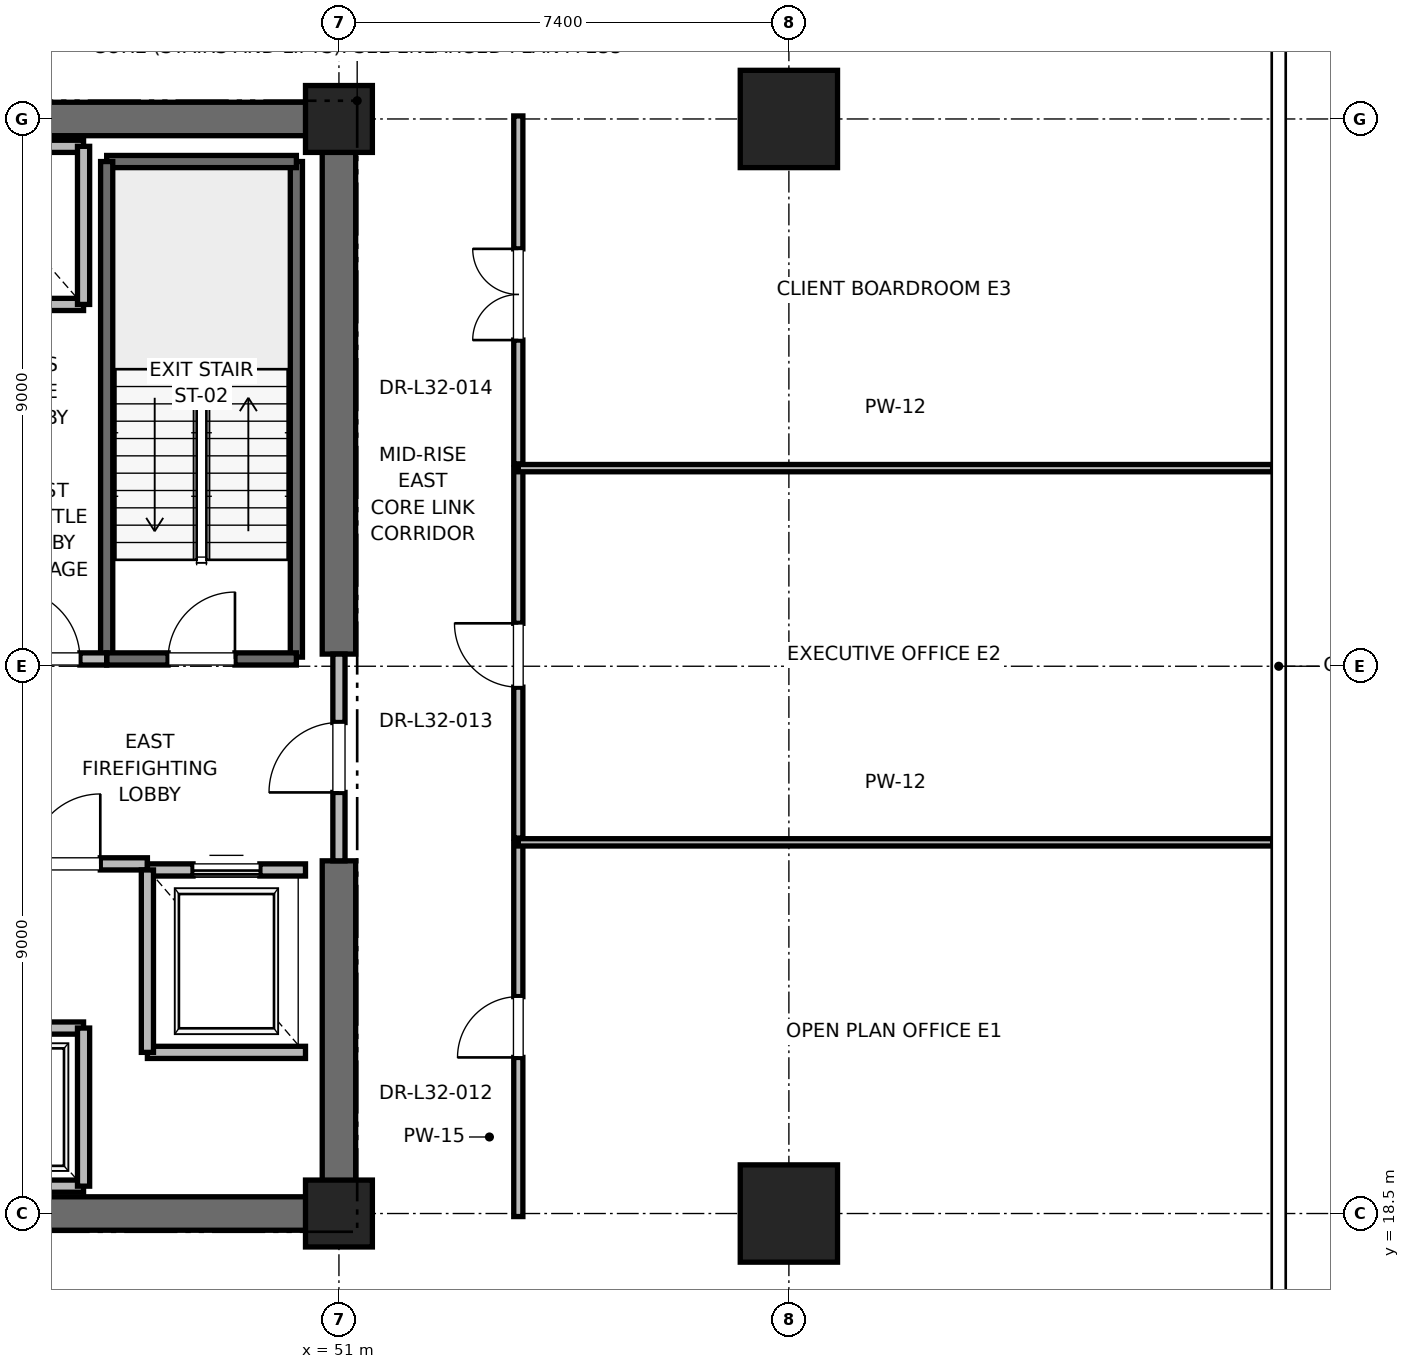
"""IFC4 building model, lengths in metres.
Left out: names, types, materials, properties, quantities, classifications, styles, units other than length and angle.
Written with IfcOpenShell. Run it as: python <this file> out.ifc"""

import sys

from ifc_helpers import new_model, si_unit, direction, frame, frame_2d, origin, origin_2d, place, context, subcontext, project, spatial, rectangle, extrude, element, fill, save


model = new_model("IFC4")
c1 = context("Model", 3, precision=1e-05, world=origin(), true_north=direction((0.0, 1.0)))
c2 = subcontext(c1, "Body", "Model", "MODEL_VIEW")
j1 = project(units=[si_unit("LENGTHUNIT", "METRE"), si_unit("PLANEANGLEUNIT", "RADIAN")], contexts=[c1])
p1 = place(None, origin())
s1 = spatial("IfcSite", under=j1, at=p1, CompositionType="ELEMENT")
p2 = place(p1, origin())
s2 = spatial("IfcBuilding", under=s1, at=p2, CompositionType="ELEMENT")
p3 = place(p2, frame((0.0, 0.0, 140.4)))
s3 = spatial("IfcBuildingStorey", under=s2, at=p3, CompositionType="ELEMENT", Elevation=140.4)
for number, where, z_axis, x_axis in (
    (1, (58.4, 18.5, 0.0), (0.0, 0.0, 1.0), (1.0, 0.0, 0.0)),
    (2, (58.4, 36.5, 0.0), (0.0, 0.0, 1.0), (1.0, 0.0, 0.0)),
):
    element("IfcColumn", number, at=place(p3, frame(where, z_axis=z_axis, x_axis=x_axis)), inside=s3, PredefinedType="COLUMN", context=c2, shape_type="SweptSolid", body=[
        extrude(rectangle(XDim=1.6, YDim=1.6, at=origin_2d()), origin(), (0.0, 0.0, 1.0), 4.0),
    ])
for number, where, z_axis, x_axis in (
    (3, (51.0, 18.5, 0.0), (0.0, 0.0, 1.0), (1.0, 0.0, 0.0)),
    (4, (51.0, 36.5, 0.0), (0.0, 0.0, 1.0), (1.0, 0.0, 0.0)),
):
    element("IfcColumn", number, at=place(p3, frame(where, z_axis=z_axis, x_axis=x_axis)), inside=s3, PredefinedType="PILASTER", context=c2, shape_type="SweptSolid", body=[
        extrude(rectangle(XDim=1.1, YDim=1.1, at=origin_2d()), origin(), (0.0, 0.0, 1.0), 4.0),
    ])
p4 = place(p3, frame((41.8, 18.5, 0.0), z_axis=(0.0, 0.0, 1.0), x_axis=(1.0, 0.0, 0.0)))
e5 = element("IfcWall", 5, at=p4, inside=s3, PredefinedType="SHEAR", context=c2, shape_type="SweptSolid", body=[
    extrude(rectangle(XDim=9.2, YDim=0.55, at=frame_2d((4.6, 0.0))), origin(), (0.0, 0.0, 1.0), 3.775),
])
for number, where, z_axis, x_axis in (
    (6, (45.2, 36.5, 0.0), (0.0, 0.0, 1.0), (1.0, 0.0, 0.0)),
    (7, (51.0, 18.5, 0.0), (0.0, 0.0, 1.0), (0.0, 1.0, 0.0)),
):
    element("IfcWall", number, at=place(p3, frame(where, z_axis=z_axis, x_axis=x_axis)), inside=s3, PredefinedType="SHEAR", context=c2, shape_type="SweptSolid", body=[
        extrude(rectangle(XDim=5.8, YDim=0.55, at=frame_2d((2.9, 0.0))), origin(), (0.0, 0.0, 1.0), 3.775),
    ])
p5 = place(p3, frame((51.0, 27.7, 0.0), z_axis=(0.0, 0.0, 1.0), x_axis=(0.0, 1.0, 0.0)))
e8 = element("IfcWall", 8, at=p5, inside=s3, PredefinedType="SHEAR", context=c2, shape_type="SweptSolid", body=[
    extrude(rectangle(XDim=8.8, YDim=0.55, at=frame_2d((4.4, 0.0))), origin(), (0.0, 0.0, 1.0), 3.775),
])
p6 = place(p3, frame((50.3, 27.65, 0.0), z_axis=(0.0, 0.0, 1.0), x_axis=(0.0, 1.0, 0.0)))
e9 = element("IfcWall", 9, at=p6, inside=s3, PredefinedType="SOLIDWALL", context=c2, shape_type="SweptSolid", body=[
    extrude(rectangle(XDim=8.15, YDim=0.2, at=frame_2d((4.075, 0.0))), origin(), (0.0, 0.0, 1.0), 3.775),
])
p7 = place(p3, frame((47.18, 35.8, 0.0), z_axis=(0.0, 0.0, 1.0), x_axis=(1.0, 0.0, 0.0)))
e10 = element("IfcWall", 10, at=p7, inside=s3, PredefinedType="SOLIDWALL", context=c2, shape_type="SweptSolid", body=[
    extrude(rectangle(XDim=3.12, YDim=0.2, at=frame_2d((1.56, 0.0))), origin(), (0.0, 0.0, 1.0), 3.775),
])
p8 = place(p3, frame((47.18, 27.62, 0.0), z_axis=(0.0, 0.0, 1.0), x_axis=(0.0, 1.0, 0.0)))
e11 = element("IfcWall", 11, at=p8, inside=s3, PredefinedType="SOLIDWALL", context=c2, shape_type="SweptSolid", body=[
    extrude(rectangle(XDim=8.18, YDim=0.2, at=frame_2d((4.09, 0.0))), origin(), (0.0, 0.0, 1.0), 3.775),
])
p9 = place(p3, frame((47.18, 27.62, 0.0), z_axis=(0.0, 0.0, 1.0), x_axis=(1.0, 0.0, 0.0)))
e12 = element("IfcWall", 12, at=p9, inside=s3, PredefinedType="SOLIDWALL", context=c2, shape_type="SweptSolid", body=[
    extrude(rectangle(XDim=3.12, YDim=0.2, at=frame_2d((1.56, 0.0))), origin(), (0.0, 0.0, 1.0), 3.775),
])
p10 = place(p9, frame((1.01, 0.0, 0.0)))
e13 = element("IfcOpeningElement", 13, at=p10, cuts=e12, PredefinedType="OPENING", context=c2, shape_type="SweptSolid", body=[
    extrude(rectangle(XDim=1.1, YDim=2.15, at=frame_2d((0.55, 1.075))), frame((0.0, 0.1, 0.0), z_axis=(0.0, -1.0, 0.0), x_axis=(1.0, 0.0, 0.0)), (0.0, 0.0, 1.0), 0.2),
])
p11 = place(p3, frame((45.15, 24.25, 0.0), z_axis=(0.0, 0.0, 1.0), x_axis=(1.0, 0.0, 0.0)))
e14 = element("IfcWall", 14, at=p11, inside=s3, PredefinedType="PARTITIONING", context=c2, shape_type="SweptSolid", body=[
    extrude(rectangle(XDim=2.7, YDim=0.2, at=frame_2d((1.35, 0.0))), origin(), (0.0, 0.0, 1.0), 3.775),
])
p12 = place(p11, frame((0.775, 0.0, 0.0)))
e15 = element("IfcOpeningElement", 15, at=p12, cuts=e14, PredefinedType="OPENING", context=c2, shape_type="SweptSolid", body=[
    extrude(rectangle(XDim=1.15, YDim=2.2, at=frame_2d((0.575, 1.1))), frame((0.0, 0.1, 0.0), z_axis=(0.0, -1.0, 0.0), x_axis=(1.0, 0.0, 0.0)), (0.0, 0.0, 1.0), 0.2),
])
p13 = place(p3, frame((45.15, 27.62, 0.0), z_axis=(0.0, 0.0, 1.0), x_axis=(1.0, 0.0, 0.0)))
e16 = element("IfcWall", 16, at=p13, inside=s3, PredefinedType="PARTITIONING", context=c2, shape_type="SweptSolid", body=[
    extrude(rectangle(XDim=2.03, YDim=0.2, at=frame_2d((1.015, 0.0))), origin(), (0.0, 0.0, 1.0), 3.775),
])
p14 = place(p13, frame((0.44, 0.0, 0.0)))
e17 = element("IfcOpeningElement", 17, at=p14, cuts=e16, PredefinedType="OPENING", context=c2, shape_type="SweptSolid", body=[
    extrude(rectangle(XDim=1.15, YDim=2.2, at=frame_2d((0.575, 1.1))), frame((0.0, 0.1, 0.0), z_axis=(0.0, -1.0, 0.0), x_axis=(1.0, 0.0, 0.0)), (0.0, 0.0, 1.0), 0.2),
])
p15 = place(p3, frame((51.0, 24.3, 0.0), z_axis=(0.0, 0.0, 1.0), x_axis=(0.0, 1.0, 0.0)))
e18 = element("IfcWall", 18, at=p15, inside=s3, PredefinedType="PARTITIONING", context=c2, shape_type="SweptSolid", body=[
    extrude(rectangle(XDim=3.4, YDim=0.2, at=frame_2d((1.7, 0.0))), origin(), (0.0, 0.0, 1.0), 2.755),
])
p16 = place(p15, frame((1.125, 0.0, 0.0)))
e19 = element("IfcOpeningElement", 19, at=p16, cuts=e18, PredefinedType="OPENING", context=c2, shape_type="SweptSolid", body=[
    extrude(rectangle(XDim=1.15, YDim=2.2, at=frame_2d((0.575, 1.1))), frame((0.0, 0.1, 0.0), z_axis=(0.0, -1.0, 0.0), x_axis=(1.0, 0.0, 0.0)), (0.0, 0.0, 1.0), 0.2),
])
p17 = place(p3, frame((47.85, 21.15, 0.0), z_axis=(0.0, 0.0, 1.0), x_axis=(1.0, 0.0, 0.0)))
e20 = element("IfcWall", 20, at=p17, inside=s3, PredefinedType="SOLIDWALL", context=c2, shape_type="SweptSolid", body=[
    extrude(rectangle(XDim=2.6, YDim=0.2, at=frame_2d((1.3, 0.0))), origin(), (0.0, 0.0, 1.0), 3.775),
])
p18 = place(p3, frame((50.45, 24.15, 0.0), z_axis=(0.0, 0.0, 1.0), x_axis=(-1.0, 0.0, 0.0)))
e21 = element("IfcWall", 21, at=p18, inside=s3, PredefinedType="SOLIDWALL", context=c2, shape_type="SweptSolid", body=[
    extrude(rectangle(XDim=2.6, YDim=0.2, at=frame_2d((1.3, 0.0))), origin(), (0.0, 0.0, 1.0), 2.755),
])
p19 = place(p18, frame((0.75, 0.0, 0.0)))
e22 = element("IfcOpeningElement", 22, at=p19, cuts=e21, PredefinedType="OPENING", context=c2, shape_type="SweptSolid", body=[
    extrude(rectangle(XDim=1.1, YDim=2.2, at=frame_2d((0.55, 1.1))), frame((0.0, 0.1, 0.0), z_axis=(0.0, -1.0, 0.0), x_axis=(1.0, 0.0, 0.0)), (0.0, 0.0, 1.0), 0.2),
])
p20 = place(p3, frame((47.85, 24.15, 0.0), z_axis=(0.0, 0.0, 1.0), x_axis=(0.0, -1.0, 0.0)))
e23 = element("IfcWall", 23, at=p20, inside=s3, PredefinedType="SOLIDWALL", context=c2, shape_type="SweptSolid", body=[
    extrude(rectangle(XDim=3.0, YDim=0.2, at=frame_2d((1.5, 0.0))), origin(), (0.0, 0.0, 1.0), 3.775),
])
p21 = place(p3, frame((44.5, 18.95, 0.0), z_axis=(0.0, 0.0, 1.0), x_axis=(1.0, 0.0, 0.0)))
e24 = element("IfcWall", 24, at=p21, inside=s3, PredefinedType="SOLIDWALL", context=c2, shape_type="SweptSolid", body=[
    extrude(rectangle(XDim=2.3, YDim=0.2, at=frame_2d((1.15, 0.0))), origin(), (0.0, 0.0, 1.0), 3.775),
])
p22 = place(p3, frame((46.8, 21.55, 0.0), z_axis=(0.0, 0.0, 1.0), x_axis=(-1.0, 0.0, 0.0)))
e25 = element("IfcWall", 25, at=p22, inside=s3, PredefinedType="SOLIDWALL", context=c2, shape_type="SweptSolid", body=[
    extrude(rectangle(XDim=2.3, YDim=0.2, at=frame_2d((1.15, 0.0))), origin(), (0.0, 0.0, 1.0), 3.775),
])
p23 = place(p22, frame((0.6, 0.0, 0.0)))
e26 = element("IfcOpeningElement", 26, at=p23, cuts=e25, PredefinedType="OPENING", context=c2, shape_type="SweptSolid", body=[
    extrude(rectangle(XDim=1.1, YDim=2.2, at=frame_2d((0.55, 1.1))), frame((0.0, 0.1, 0.0), z_axis=(0.0, -1.0, 0.0), x_axis=(1.0, 0.0, 0.0)), (0.0, 0.0, 1.0), 0.2),
])
p24 = place(p3, frame((46.8, 18.95, 0.0), z_axis=(0.0, 0.0, 1.0), x_axis=(0.0, 1.0, 0.0)))
e27 = element("IfcWall", 27, at=p24, inside=s3, PredefinedType="SOLIDWALL", context=c2, shape_type="SweptSolid", body=[
    extrude(rectangle(XDim=2.6, YDim=0.2, at=frame_2d((1.3, 0.0))), origin(), (0.0, 0.0, 1.0), 3.775),
])
p25 = place(p3, frame((44.5, 33.45, 0.0), z_axis=(0.0, 0.0, 1.0), x_axis=(1.0, 0.0, 0.0)))
e28 = element("IfcWall", 28, at=p25, inside=s3, PredefinedType="SOLIDWALL", context=c2, shape_type="SweptSolid", body=[
    extrude(rectangle(XDim=2.3, YDim=0.2, at=frame_2d((1.15, 0.0))), origin(), (0.0, 0.0, 1.0), 3.775),
])
p26 = place(p3, frame((46.8, 36.05, 0.0), z_axis=(0.0, 0.0, 1.0), x_axis=(-1.0, 0.0, 0.0)))
e29 = element("IfcWall", 29, at=p26, inside=s3, PredefinedType="SOLIDWALL", context=c2, shape_type="SweptSolid", body=[
    extrude(rectangle(XDim=2.3, YDim=0.2, at=frame_2d((1.15, 0.0))), origin(), (0.0, 0.0, 1.0), 2.755),
])
p27 = place(p3, frame((46.8, 33.45, 0.0), z_axis=(0.0, 0.0, 1.0), x_axis=(0.0, 1.0, 0.0)))
e30 = element("IfcWall", 30, at=p27, inside=s3, PredefinedType="SOLIDWALL", context=c2, shape_type="SweptSolid", body=[
    extrude(rectangle(XDim=2.6, YDim=0.2, at=frame_2d((1.3, 0.0))), origin(), (0.0, 0.0, 1.0), 3.775),
])
p28 = place(p3, frame((53.95, 18.45, 0.0), z_axis=(0.0, 0.0, 1.0), x_axis=(0.0, 1.0, 0.0)))
e31 = element("IfcWall", 31, at=p28, inside=s3, PredefinedType="PARTITIONING", context=c2, shape_type="SweptSolid", body=[
    extrude(rectangle(XDim=6.154, YDim=0.15, at=frame_2d((3.077, 0.0))), origin(), (0.0, 0.0, 1.0), 2.85),
])
p29 = place(p28, frame((2.617, 0.0, 0.0)))
e32 = element("IfcOpeningElement", 32, at=p29, cuts=e31, PredefinedType="OPENING", context=c2, shape_type="SweptSolid", body=[
    extrude(rectangle(XDim=1.0, YDim=2.15, at=frame_2d((0.5, 1.075))), frame((0.0, 0.075, 0.0), z_axis=(0.0, -1.0, 0.0), x_axis=(1.0, 0.0, 0.0)), (0.0, 0.0, 1.0), 0.15),
])
p30 = place(p3, frame((53.95, 24.604, 0.0), z_axis=(0.0, 0.0, 1.0), x_axis=(1.0, 0.0, 0.0)))
e33 = element("IfcWall", 33, at=p30, inside=s3, PredefinedType="PARTITIONING", context=c2, shape_type="SweptSolid", body=[
    extrude(rectangle(XDim=12.406, YDim=0.12, at=frame_2d((6.203, 0.0))), origin(), (0.0, 0.0, 1.0), 2.85),
])
p31 = place(p3, frame((53.95, 24.674, 0.0), z_axis=(0.0, 0.0, 1.0), x_axis=(0.0, 1.0, 0.0)))
e34 = element("IfcWall", 34, at=p31, inside=s3, PredefinedType="PARTITIONING", context=c2, shape_type="SweptSolid", body=[
    extrude(rectangle(XDim=6.084, YDim=0.15, at=frame_2d((3.042, 0.0))), origin(), (0.0, 0.0, 1.0), 2.85),
])
p32 = place(p31, frame((2.482, 0.0, 0.0)))
e35 = element("IfcOpeningElement", 35, at=p32, cuts=e34, PredefinedType="OPENING", context=c2, shape_type="SweptSolid", body=[
    extrude(rectangle(XDim=1.05, YDim=2.2, at=frame_2d((0.525, 1.1))), frame((0.0, 0.075, 0.0), z_axis=(0.0, -1.0, 0.0), x_axis=(1.0, 0.0, 0.0)), (0.0, 0.0, 1.0), 0.15),
])
p33 = place(p3, frame((53.95, 30.758, 0.0), z_axis=(0.0, 0.0, 1.0), x_axis=(1.0, 0.0, 0.0)))
e36 = element("IfcWall", 36, at=p33, inside=s3, PredefinedType="PARTITIONING", context=c2, shape_type="SweptSolid", body=[
    extrude(rectangle(XDim=12.406, YDim=0.12, at=frame_2d((6.203, 0.0))), origin(), (0.0, 0.0, 1.0), 2.85),
])
p34 = place(p3, frame((53.95, 30.828, 0.0), z_axis=(0.0, 0.0, 1.0), x_axis=(0.0, 1.0, 0.0)))
e37 = element("IfcWall", 37, at=p34, inside=s3, PredefinedType="PARTITIONING", context=c2, shape_type="SweptSolid", body=[
    extrude(rectangle(XDim=5.722, YDim=0.15, at=frame_2d((2.861, 0.0))), origin(), (0.0, 0.0, 1.0), 2.85),
])
p35 = place(p34, frame((2.036, 0.0, 0.0)))
e38 = element("IfcOpeningElement", 38, at=p35, cuts=e37, PredefinedType="OPENING", context=c2, shape_type="SweptSolid", body=[
    extrude(rectangle(XDim=1.5, YDim=2.25, at=frame_2d((0.75, 1.125))), frame((0.0, 0.075, 0.0), z_axis=(0.0, -1.0, 0.0), x_axis=(1.0, 0.0, 0.0)), (0.0, 0.0, 1.0), 0.15),
])
p36 = place(p10, origin())
e39 = element("IfcDoor", 39, at=p36, inside=s3, OperationType="SINGLE_SWING_RIGHT", PredefinedType="DOOR", context=c2, shape_type="SweptSolid", body=[
    extrude(rectangle(XDim=1.1, YDim=2.15, at=frame_2d((0.55, 1.075))), frame((0.0, 0.025, 0.0), z_axis=(0.0, -1.0, 0.0), x_axis=(1.0, 0.0, 0.0)), (0.0, 0.0, 1.0), 0.05),
])
fill(e13, e39)
p37 = place(p12, origin())
e40 = element("IfcDoor", 40, at=p37, inside=s3, OperationType="SINGLE_SWING_RIGHT", PredefinedType="DOOR", context=c2, shape_type="SweptSolid", body=[
    extrude(rectangle(XDim=1.15, YDim=2.2, at=frame_2d((0.575, 1.1))), frame((0.0, 0.025, 0.0), z_axis=(0.0, -1.0, 0.0), x_axis=(1.0, 0.0, 0.0)), (0.0, 0.0, 1.0), 0.05),
])
fill(e15, e40)
p38 = place(p14, origin())
e41 = element("IfcDoor", 41, at=p38, inside=s3, OperationType="SINGLE_SWING_LEFT", PredefinedType="DOOR", context=c2, shape_type="SweptSolid", body=[
    extrude(rectangle(XDim=1.15, YDim=2.2, at=frame_2d((0.575, 1.1))), frame((0.0, 0.025, 0.0), z_axis=(0.0, -1.0, 0.0), x_axis=(1.0, 0.0, 0.0)), (0.0, 0.0, 1.0), 0.05),
])
fill(e17, e41)
p39 = place(p16, origin())
e42 = element("IfcDoor", 42, at=p39, inside=s3, OperationType="SINGLE_SWING_LEFT", PredefinedType="DOOR", context=c2, shape_type="SweptSolid", body=[
    extrude(rectangle(XDim=1.15, YDim=2.2, at=frame_2d((0.575, 1.1))), frame((0.0, 0.025, 0.0), z_axis=(0.0, -1.0, 0.0), x_axis=(1.0, 0.0, 0.0)), (0.0, 0.0, 1.0), 0.05),
])
fill(e19, e42)
p40 = place(p19, origin())
e43 = element("IfcDoor", 43, at=p40, inside=s3, OperationType="SLIDING_TO_RIGHT", PredefinedType="DOOR", context=c2, shape_type="SweptSolid", body=[
    extrude(rectangle(XDim=1.1, YDim=2.2, at=frame_2d((0.55, 1.1))), frame((0.0, 0.025, 0.0), z_axis=(0.0, -1.0, 0.0), x_axis=(1.0, 0.0, 0.0)), (0.0, 0.0, 1.0), 0.05),
])
fill(e22, e43)
p41 = place(p29, origin())
e44 = element("IfcDoor", 44, at=p41, inside=s3, OperationType="SINGLE_SWING_LEFT", PredefinedType="DOOR", context=c2, shape_type="SweptSolid", body=[
    extrude(rectangle(XDim=1.0, YDim=2.15, at=frame_2d((0.5, 1.075))), frame((0.0, 0.025, 0.0), z_axis=(0.0, -1.0, 0.0), x_axis=(1.0, 0.0, 0.0)), (0.0, 0.0, 1.0), 0.05),
])
fill(e32, e44)
p42 = place(p32, origin())
e45 = element("IfcDoor", 45, at=p42, inside=s3, OperationType="SINGLE_SWING_RIGHT", PredefinedType="DOOR", context=c2, shape_type="SweptSolid", body=[
    extrude(rectangle(XDim=1.05, YDim=2.2, at=frame_2d((0.525, 1.1))), frame((0.0, 0.025, 0.0), z_axis=(0.0, -1.0, 0.0), x_axis=(1.0, 0.0, 0.0)), (0.0, 0.0, 1.0), 0.05),
])
fill(e35, e45)
p43 = place(p35, origin())
e46 = element("IfcDoor", 46, at=p43, inside=s3, OperationType="DOUBLE_DOOR_SINGLE_SWING", PredefinedType="DOOR", context=c2, shape_type="SweptSolid", body=[
    extrude(rectangle(XDim=1.5, YDim=2.25, at=frame_2d((0.75, 1.125))), frame((0.0, 0.025, 0.0), z_axis=(0.0, -1.0, 0.0), x_axis=(1.0, 0.0, 0.0)), (0.0, 0.0, 1.0), 0.05),
])
fill(e38, e46)
save(model, sys.argv[1])
